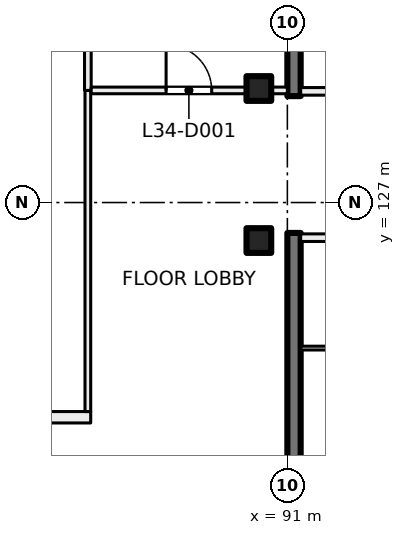
"""IFC4 building model, lengths in metres.
Left out: names, types, materials, properties, quantities, classifications, styles, units other than length and angle.
Written with IfcOpenShell. Run it as: python <this file> out.ifc"""

import sys

from ifc_helpers import new_model, si_unit, direction, frame, frame_2d, origin, origin_2d, place, context, subcontext, project, spatial, rectangle, extrude, element, fill, save


model = new_model("IFC4")
c1 = context("Model", 3, precision=1e-05, world=origin(), true_north=direction((0.0, 1.0)))
c2 = subcontext(c1, "Body", "Model", "MODEL_VIEW")
j1 = project(units=[si_unit("LENGTHUNIT", "METRE"), si_unit("PLANEANGLEUNIT", "RADIAN")], contexts=[c1])
p1 = place(None, origin())
s1 = spatial("IfcSite", under=j1, at=p1, CompositionType="ELEMENT")
p2 = place(p1, origin())
s2 = spatial("IfcBuilding", under=s1, at=p2, CompositionType="ELEMENT")
p3 = place(p2, frame((0.0, 0.0, 146.5)))
s3 = spatial("IfcBuildingStorey", under=s2, at=p3, CompositionType="ELEMENT", Elevation=146.5)
for number, where, z_axis, x_axis in (
    (1, (90.25, 130.0, 0.0), (0.0, 0.0, 1.0), (1.0, 0.0, 0.0)),
    (2, (90.25, 126.0, 0.0), (0.0, 0.0, 1.0), (1.0, 0.0, 0.0)),
):
    element("IfcColumn", number, at=place(p3, frame(where, z_axis=z_axis, x_axis=x_axis)), inside=s3, PredefinedType="COLUMN", context=c2, shape_type="SweptSolid", body=[
        extrude(rectangle(XDim=0.65, YDim=0.65, at=origin_2d()), origin(), (0.0, 0.0, 1.0), 4.0),
    ])
for number, where, z_axis, x_axis in (
    (3, (91.175, 138.45, 0.0), (0.0, 0.0, 1.0), (0.0, -1.0, 0.0)),
    (4, (91.175, 126.2, 0.0), (0.0, 0.0, 1.0), (0.0, -1.0, 0.0)),
):
    element("IfcWall", number, at=place(p3, frame(where, z_axis=z_axis, x_axis=x_axis)), inside=s3, PredefinedType="SHEAR", context=c2, shape_type="SweptSolid", body=[
        extrude(rectangle(XDim=8.65, YDim=0.35, at=frame_2d((4.325, 0.0))), origin(), (0.0, 0.0, 1.0), 4.0),
    ])
p4 = place(p3, frame((95.225, 126.075, 0.0), z_axis=(0.0, 0.0, 1.0), x_axis=(-1.0, 0.0, 0.0)))
e5 = element("IfcWall", 5, at=p4, inside=s3, PredefinedType="PARTITIONING", context=c2, shape_type="SweptSolid", body=[
    extrude(rectangle(XDim=3.875, YDim=0.2, at=frame_2d((1.938, 0.0))), origin(), (0.0, 0.0, 1.0), 3.625),
])
p5 = place(p4, frame((0.3, 0.0, 0.0)))
e6 = element("IfcOpeningElement", 6, at=p5, cuts=e5, PredefinedType="OPENING", context=c2, shape_type="SweptSolid", body=[
    extrude(rectangle(XDim=1.2, YDim=2.1, at=frame_2d((0.6, 1.05))), frame((0.0, 0.11, 0.0), z_axis=(0.0, -1.0, 0.0), x_axis=(1.0, 0.0, 0.0)), (0.0, 0.0, 1.0), 0.22),
])
p6 = place(p3, frame((93.375, 123.17, 0.0), z_axis=(0.0, 0.0, 1.0), x_axis=(-1.0, 0.0, 0.0)))
e7 = element("IfcWall", 7, at=p6, inside=s3, PredefinedType="PARTITIONING", context=c2, shape_type="SweptSolid", body=[
    extrude(rectangle(XDim=2.025, YDim=0.1, at=frame_2d((1.012, 0.0))), origin(), (0.0, 0.0, 1.0), 3.625),
])
p7 = place(p3, frame((91.35, 129.925, 0.0), z_axis=(0.0, 0.0, 1.0), x_axis=(1.0, 0.0, 0.0)))
e8 = element("IfcWall", 8, at=p7, inside=s3, PredefinedType="PARTITIONING", context=c2, shape_type="SweptSolid", body=[
    extrude(rectangle(XDim=3.875, YDim=0.2, at=frame_2d((1.938, 0.0))), origin(), (0.0, 0.0, 1.0), 3.625),
])
p8 = place(p7, frame((2.375, 0.0, 0.0)))
e9 = element("IfcOpeningElement", 9, at=p8, cuts=e8, PredefinedType="OPENING", context=c2, shape_type="SweptSolid", body=[
    extrude(rectangle(XDim=1.2, YDim=2.1, at=frame_2d((0.6, 1.05))), frame((0.0, 0.11, 0.0), z_axis=(0.0, -1.0, 0.0), x_axis=(1.0, 0.0, 0.0)), (0.0, 0.0, 1.0), 0.22),
])
p9 = place(p3, frame((50.506, 121.35, 0.0), z_axis=(0.0, 0.0, 1.0), x_axis=(1.0, 0.0, 0.0)))
e10 = element("IfcWall", 10, at=p9, inside=s3, PredefinedType="PARTITIONING", context=c2, shape_type="SweptSolid", body=[
    extrude(rectangle(XDim=35.319, YDim=0.3, at=frame_2d((17.659, 0.0))), origin(), (0.0, 0.0, 1.0), 3.625),
])
p10 = place(p9, frame((25.744, 0.0, 0.0)))
e11 = element("IfcOpeningElement", 11, at=p10, cuts=e10, PredefinedType="OPENING", context=c2, shape_type="SweptSolid", body=[
    extrude(rectangle(XDim=1.0, YDim=2.1, at=frame_2d((0.5, 1.05))), frame((0.0, 0.16, 0.0), z_axis=(0.0, -1.0, 0.0), x_axis=(1.0, 0.0, 0.0)), (0.0, 0.0, 1.0), 0.32),
])
p11 = place(p9, frame((32.094, 0.0, 0.0)))
e12 = element("IfcOpeningElement", 12, at=p11, cuts=e10, PredefinedType="OPENING", context=c2, shape_type="SweptSolid", body=[
    extrude(rectangle(XDim=1.8, YDim=2.1, at=frame_2d((0.9, 1.05))), frame((0.0, 0.16, 0.0), z_axis=(0.0, -1.0, 0.0), x_axis=(1.0, 0.0, 0.0)), (0.0, 0.0, 1.0), 0.32),
])
p12 = place(p9, frame((13.844, 0.0, 0.0)))
e13 = element("IfcOpeningElement", 13, at=p12, cuts=e10, PredefinedType="OPENING", context=c2, shape_type="SweptSolid", body=[
    extrude(rectangle(XDim=0.8, YDim=2.1, at=frame_2d((0.4, 1.05))), frame((0.0, 0.16, 0.0), z_axis=(0.0, -1.0, 0.0), x_axis=(1.0, 0.0, 0.0)), (0.0, 0.0, 1.0), 0.32),
])
p13 = place(p9, frame((9.144, 0.0, 0.0)))
e14 = element("IfcOpeningElement", 14, at=p13, cuts=e10, PredefinedType="OPENING", context=c2, shape_type="SweptSolid", body=[
    extrude(rectangle(XDim=1.2, YDim=2.1, at=frame_2d((0.6, 1.05))), frame((0.0, 0.16, 0.0), z_axis=(0.0, -1.0, 0.0), x_axis=(1.0, 0.0, 0.0)), (0.0, 0.0, 1.0), 0.32),
])
p14 = place(p9, frame((17.844, 0.0, 0.0)))
e15 = element("IfcOpeningElement", 15, at=p14, cuts=e10, PredefinedType="OPENING", context=c2, shape_type="SweptSolid", body=[
    extrude(rectangle(XDim=1.8, YDim=2.1, at=frame_2d((0.9, 1.05))), frame((0.0, 0.16, 0.0), z_axis=(0.0, -1.0, 0.0), x_axis=(1.0, 0.0, 0.0)), (0.0, 0.0, 1.0), 0.32),
])
p15 = place(p9, frame((2.543, 0.0, 0.0)))
e16 = element("IfcOpeningElement", 16, at=p15, cuts=e10, PredefinedType="OPENING", context=c2, shape_type="SweptSolid", body=[
    extrude(rectangle(XDim=1.8, YDim=2.1, at=frame_2d((0.9, 1.05))), frame((0.0, 0.16, 0.0), z_axis=(0.0, -1.0, 0.0), x_axis=(1.0, 0.0, 0.0)), (0.0, 0.0, 1.0), 0.32),
])
p16 = place(p3, frame((85.75, 121.5, 0.0), z_axis=(0.0, 0.0, 1.0), x_axis=(0.0, 1.0, 0.0)))
e17 = element("IfcWall", 17, at=p16, inside=s3, PredefinedType="PARTITIONING", context=c2, shape_type="SweptSolid", body=[
    extrude(rectangle(XDim=8.45, YDim=0.15, at=frame_2d((4.225, 0.0))), origin(), (0.0, 0.0, 1.0), 3.625),
])
p17 = place(p3, frame((85.75, 129.95, 0.0), z_axis=(0.0, 0.0, 1.0), x_axis=(0.0, 1.0, 0.0)))
e18 = element("IfcWall", 18, at=p17, inside=s3, PredefinedType="PARTITIONING", context=c2, shape_type="SweptSolid", body=[
    extrude(rectangle(XDim=8.45, YDim=0.175, at=frame_2d((4.225, 0.0))), origin(), (0.0, 0.0, 1.0), 3.625),
])
p18 = place(p3, frame((85.838, 129.95, 0.0), z_axis=(0.0, 0.0, 1.0), x_axis=(1.0, 0.0, 0.0)))
e19 = element("IfcWall", 19, at=p18, inside=s3, PredefinedType="PARTITIONING", context=c2, shape_type="SweptSolid", body=[
    extrude(rectangle(XDim=5.162, YDim=0.175, at=frame_2d((2.581, 0.0))), origin(), (0.0, 0.0, 1.0), 3.625),
])
p19 = place(p18, frame((1.971, 0.0, 0.0)))
e20 = element("IfcOpeningElement", 20, at=p19, cuts=e19, PredefinedType="OPENING", context=c2, shape_type="SweptSolid", body=[
    extrude(rectangle(XDim=1.2, YDim=2.1, at=frame_2d((0.6, 1.05))), frame((0.0, 0.097, 0.0), z_axis=(0.0, -1.0, 0.0), x_axis=(1.0, 0.0, 0.0)), (0.0, 0.0, 1.0), 0.195),
])
p20 = place(p19, origin())
e21 = element("IfcDoor", 21, at=p20, inside=s3, OperationType="DOUBLE_DOOR_SINGLE_SWING", PredefinedType="DOOR", context=c2, shape_type="SweptSolid", body=[
    extrude(rectangle(XDim=1.2, YDim=2.1, at=frame_2d((0.6, 1.05))), frame((0.0, 0.025, 0.0), z_axis=(0.0, -1.0, 0.0), x_axis=(1.0, 0.0, 0.0)), (0.0, 0.0, 1.0), 0.05),
])
fill(e20, e21)
save(model, sys.argv[1])
